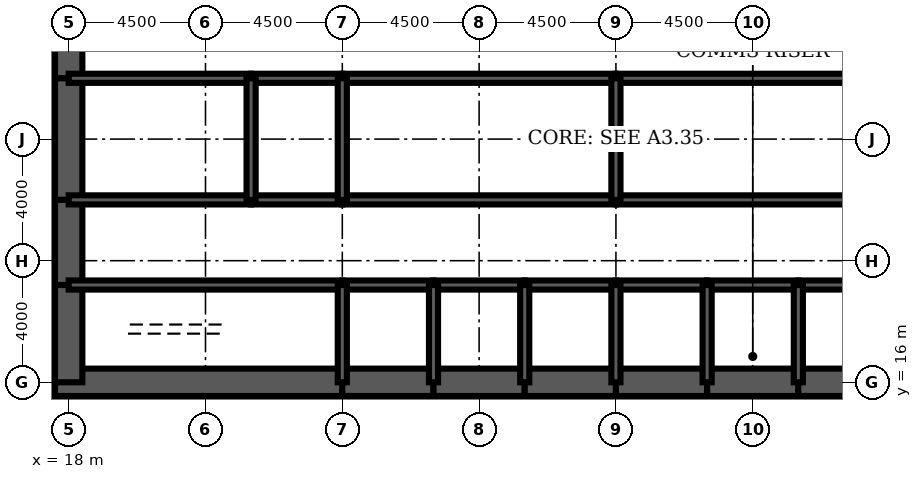
"""IFC4 building model, lengths in metres.
Left out: names, types, materials, properties, quantities, classifications, styles, units other than length and angle.
Written with IfcOpenShell. Run it as: python <this file> out.ifc"""

import sys

from ifc_helpers import new_model, si_unit, direction, frame, frame_2d, origin, place, context, subcontext, project, spatial, rectangle, extrude, element, fill, save


model = new_model("IFC4")
c1 = context("Model", 3, precision=1e-05, world=origin(), true_north=direction((0.0, 1.0)))
c2 = subcontext(c1, "Body", "Model", "MODEL_VIEW")
j1 = project(units=[si_unit("LENGTHUNIT", "METRE"), si_unit("PLANEANGLEUNIT", "RADIAN")], contexts=[c1])
p1 = place(None, origin())
s1 = spatial("IfcSite", under=j1, at=p1, CompositionType="ELEMENT")
p2 = place(p1, origin())
s2 = spatial("IfcBuilding", under=s1, at=p2, CompositionType="ELEMENT")
p3 = place(p2, frame((0.0, 0.0, 150.9)))
s3 = spatial("IfcBuildingStorey", under=s2, at=p3, CompositionType="ELEMENT", Elevation=150.9)
p4 = place(p3, frame((17.55, 16.0, 0.0), z_axis=(0.0, 0.0, 1.0), x_axis=(1.0, 0.0, 0.0)))
e1 = element("IfcWall", 1, at=p4, inside=s3, PredefinedType="SHEAR", context=c2, shape_type="SweptSolid", body=[
    extrude(rectangle(XDim=9.45, YDim=0.9, at=frame_2d((4.725, 0.0))), origin(), (0.0, 0.0, 1.0), 4.2),
])
for number, where, z_axis, x_axis in (
    (2, (27.0, 16.0, 0.0), (0.0, 0.0, 1.0), (1.0, 0.0, 0.0)),
    (3, (30.0, 16.0, 0.0), (0.0, 0.0, 1.0), (1.0, 0.0, 0.0)),
    (4, (33.0, 16.0, 0.0), (0.0, 0.0, 1.0), (1.0, 0.0, 0.0)),
    (5, (36.0, 16.0, 0.0), (0.0, 0.0, 1.0), (1.0, 0.0, 0.0)),
    (6, (39.0, 16.0, 0.0), (0.0, 0.0, 1.0), (1.0, 0.0, 0.0)),
    (7, (42.0, 16.0, 0.0), (0.0, 0.0, 1.0), (1.0, 0.0, 0.0)),
):
    element("IfcWall", number, at=place(p3, frame(where, z_axis=z_axis, x_axis=x_axis)), inside=s3, PredefinedType="SHEAR", context=c2, shape_type="SweptSolid", body=[
        extrude(rectangle(XDim=3.0, YDim=0.9, at=frame_2d((1.5, 0.0))), origin(), (0.0, 0.0, 1.0), 4.2),
    ])
p5 = place(p3, frame((18.0, 28.8, 0.0), z_axis=(0.0, 0.0, 1.0), x_axis=(0.0, -1.0, 0.0)))
e8 = element("IfcWall", 8, at=p5, inside=s3, PredefinedType="SHEAR", context=c2, shape_type="SweptSolid", body=[
    extrude(rectangle(XDim=2.8, YDim=0.9, at=frame_2d((1.4, 0.0))), origin(), (0.0, 0.0, 1.0), 4.2),
])
p6 = place(p5, frame((0.4, 0.0, 0.0)))
e9 = element("IfcOpeningElement", 9, at=p6, cuts=e8, PredefinedType="OPENING", context=c2, shape_type="SweptSolid", body=[
    extrude(rectangle(XDim=1.8, YDim=2.1, at=frame_2d((0.9, 1.05))), frame((0.0, 0.46, 0.0), z_axis=(0.0, -1.0, 0.0), x_axis=(1.0, 0.0, 0.0)), (0.0, 0.0, 1.0), 0.92),
])
p7 = place(p3, frame((18.0, 26.0, 0.0), z_axis=(0.0, 0.0, 1.0), x_axis=(0.0, -1.0, 0.0)))
e10 = element("IfcWall", 10, at=p7, inside=s3, PredefinedType="SHEAR", context=c2, shape_type="SweptSolid", body=[
    extrude(rectangle(XDim=4.0, YDim=0.9, at=frame_2d((2.0, 0.0))), origin(), (0.0, 0.0, 1.0), 4.2),
])
p8 = place(p3, frame((18.0, 22.0, 0.0), z_axis=(0.0, 0.0, 1.0), x_axis=(0.0, -1.0, 0.0)))
e11 = element("IfcWall", 11, at=p8, inside=s3, PredefinedType="SHEAR", context=c2, shape_type="SweptSolid", body=[
    extrude(rectangle(XDim=2.8, YDim=0.9, at=frame_2d((1.4, 0.0))), origin(), (0.0, 0.0, 1.0), 4.2),
])
p9 = place(p8, frame((0.6, 0.0, 0.0)))
e12 = element("IfcOpeningElement", 12, at=p9, cuts=e11, PredefinedType="OPENING", context=c2, shape_type="SweptSolid", body=[
    extrude(rectangle(XDim=1.8, YDim=2.1, at=frame_2d((0.9, 1.05))), frame((0.0, 0.46, 0.0), z_axis=(0.0, -1.0, 0.0), x_axis=(1.0, 0.0, 0.0)), (0.0, 0.0, 1.0), 0.92),
])
p10 = place(p3, frame((18.0, 19.2, 0.0), z_axis=(0.0, 0.0, 1.0), x_axis=(0.0, -1.0, 0.0)))
e13 = element("IfcWall", 13, at=p10, inside=s3, PredefinedType="SHEAR", context=c2, shape_type="SweptSolid", body=[
    extrude(rectangle(XDim=3.2, YDim=0.9, at=frame_2d((1.6, 0.0))), origin(), (0.0, 0.0, 1.0), 4.2),
])
p11 = place(p3, frame((18.0, 19.2, 0.0), z_axis=(0.0, 0.0, 1.0), x_axis=(1.0, 0.0, 0.0)))
e14 = element("IfcWall", 14, at=p11, inside=s3, PredefinedType="SOLIDWALL", context=c2, shape_type="SweptSolid", body=[
    extrude(rectangle(XDim=9.0, YDim=0.3, at=frame_2d((4.5, 0.0))), origin(), (0.0, 0.0, 1.0), 4.2),
])
p12 = place(p11, frame((0.65, 0.0, 0.0)))
e15 = element("IfcOpeningElement", 15, at=p12, cuts=e14, PredefinedType="OPENING", context=c2, shape_type="SweptSolid", body=[
    extrude(rectangle(XDim=1.0, YDim=2.1, at=frame_2d((0.5, 1.05))), frame((0.0, 0.16, 0.0), z_axis=(0.0, -1.0, 0.0), x_axis=(1.0, 0.0, 0.0)), (0.0, 0.0, 1.0), 0.32),
])
p13 = place(p3, frame((27.0, 19.2, 0.0), z_axis=(0.0, 0.0, 1.0), x_axis=(1.0, 0.0, 0.0)))
e16 = element("IfcWall", 16, at=p13, inside=s3, PredefinedType="SOLIDWALL", context=c2, shape_type="SweptSolid", body=[
    extrude(rectangle(XDim=3.0, YDim=0.3, at=frame_2d((1.5, 0.0))), origin(), (0.0, 0.0, 1.0), 4.2),
])
p14 = place(p13, frame((0.95, 0.0, 0.0)))
e17 = element("IfcOpeningElement", 17, at=p14, cuts=e16, PredefinedType="OPENING", context=c2, shape_type="SweptSolid", body=[
    extrude(rectangle(XDim=1.1, YDim=2.2, at=frame_2d((0.55, 1.1))), frame((0.0, 0.16, 0.0), z_axis=(0.0, -1.0, 0.0), x_axis=(1.0, 0.0, 0.0)), (0.0, 0.0, 1.0), 0.32),
])
p15 = place(p3, frame((30.0, 19.2, 0.0), z_axis=(0.0, 0.0, 1.0), x_axis=(1.0, 0.0, 0.0)))
e18 = element("IfcWall", 18, at=p15, inside=s3, PredefinedType="SOLIDWALL", context=c2, shape_type="SweptSolid", body=[
    extrude(rectangle(XDim=3.0, YDim=0.3, at=frame_2d((1.5, 0.0))), origin(), (0.0, 0.0, 1.0), 4.2),
])
p16 = place(p15, frame((0.95, 0.0, 0.0)))
e19 = element("IfcOpeningElement", 19, at=p16, cuts=e18, PredefinedType="OPENING", context=c2, shape_type="SweptSolid", body=[
    extrude(rectangle(XDim=1.1, YDim=2.2, at=frame_2d((0.55, 1.1))), frame((0.0, 0.16, 0.0), z_axis=(0.0, -1.0, 0.0), x_axis=(1.0, 0.0, 0.0)), (0.0, 0.0, 1.0), 0.32),
])
p17 = place(p3, frame((33.0, 19.2, 0.0), z_axis=(0.0, 0.0, 1.0), x_axis=(1.0, 0.0, 0.0)))
e20 = element("IfcWall", 20, at=p17, inside=s3, PredefinedType="SOLIDWALL", context=c2, shape_type="SweptSolid", body=[
    extrude(rectangle(XDim=3.0, YDim=0.3, at=frame_2d((1.5, 0.0))), origin(), (0.0, 0.0, 1.0), 4.2),
])
p18 = place(p17, frame((0.95, 0.0, 0.0)))
e21 = element("IfcOpeningElement", 21, at=p18, cuts=e20, PredefinedType="OPENING", context=c2, shape_type="SweptSolid", body=[
    extrude(rectangle(XDim=1.1, YDim=2.2, at=frame_2d((0.55, 1.1))), frame((0.0, 0.16, 0.0), z_axis=(0.0, -1.0, 0.0), x_axis=(1.0, 0.0, 0.0)), (0.0, 0.0, 1.0), 0.32),
])
p19 = place(p3, frame((36.0, 19.2, 0.0), z_axis=(0.0, 0.0, 1.0), x_axis=(1.0, 0.0, 0.0)))
e22 = element("IfcWall", 22, at=p19, inside=s3, PredefinedType="SOLIDWALL", context=c2, shape_type="SweptSolid", body=[
    extrude(rectangle(XDim=3.0, YDim=0.3, at=frame_2d((1.5, 0.0))), origin(), (0.0, 0.0, 1.0), 4.2),
])
p20 = place(p19, frame((0.95, 0.0, 0.0)))
e23 = element("IfcOpeningElement", 23, at=p20, cuts=e22, PredefinedType="OPENING", context=c2, shape_type="SweptSolid", body=[
    extrude(rectangle(XDim=1.1, YDim=2.2, at=frame_2d((0.55, 1.1))), frame((0.0, 0.16, 0.0), z_axis=(0.0, -1.0, 0.0), x_axis=(1.0, 0.0, 0.0)), (0.0, 0.0, 1.0), 0.32),
])
p21 = place(p3, frame((39.0, 19.2, 0.0), z_axis=(0.0, 0.0, 1.0), x_axis=(1.0, 0.0, 0.0)))
e24 = element("IfcWall", 24, at=p21, inside=s3, PredefinedType="SOLIDWALL", context=c2, shape_type="SweptSolid", body=[
    extrude(rectangle(XDim=3.0, YDim=0.3, at=frame_2d((1.5, 0.0))), origin(), (0.0, 0.0, 1.0), 4.2),
])
p22 = place(p21, frame((1.0, 0.0, 0.0)))
e25 = element("IfcOpeningElement", 25, at=p22, cuts=e24, PredefinedType="OPENING", context=c2, shape_type="SweptSolid", body=[
    extrude(rectangle(XDim=1.0, YDim=2.1, at=frame_2d((0.5, 1.05))), frame((0.0, 0.16, 0.0), z_axis=(0.0, -1.0, 0.0), x_axis=(1.0, 0.0, 0.0)), (0.0, 0.0, 1.0), 0.32),
])
p23 = place(p3, frame((42.0, 19.2, 0.0), z_axis=(0.0, 0.0, 1.0), x_axis=(1.0, 0.0, 0.0)))
e26 = element("IfcWall", 26, at=p23, inside=s3, PredefinedType="SOLIDWALL", context=c2, shape_type="SweptSolid", body=[
    extrude(rectangle(XDim=3.0, YDim=0.3, at=frame_2d((1.5, 0.0))), origin(), (0.0, 0.0, 1.0), 4.2),
])
p24 = place(p3, frame((18.0, 22.0, 0.0), z_axis=(0.0, 0.0, 1.0), x_axis=(1.0, 0.0, 0.0)))
e27 = element("IfcWall", 27, at=p24, inside=s3, PredefinedType="SOLIDWALL", context=c2, shape_type="SweptSolid", body=[
    extrude(rectangle(XDim=6.0, YDim=0.3, at=frame_2d((3.0, 0.0))), origin(), (0.0, 0.0, 1.0), 4.2),
])
p25 = place(p24, frame((4.4, 0.0, 0.0)))
e28 = element("IfcOpeningElement", 28, at=p25, cuts=e27, PredefinedType="OPENING", context=c2, shape_type="SweptSolid", body=[
    extrude(rectangle(XDim=1.0, YDim=2.1, at=frame_2d((0.5, 1.05))), frame((0.0, 0.16, 0.0), z_axis=(0.0, -1.0, 0.0), x_axis=(1.0, 0.0, 0.0)), (0.0, 0.0, 1.0), 0.32),
])
p26 = place(p24, frame((0.85, 0.0, 0.0)))
e29 = element("IfcOpeningElement", 29, at=p26, cuts=e27, PredefinedType="OPENING", context=c2, shape_type="SweptSolid", body=[
    extrude(rectangle(XDim=1.0, YDim=2.1, at=frame_2d((0.5, 1.05))), frame((0.0, 0.16, 0.0), z_axis=(0.0, -1.0, 0.0), x_axis=(1.0, 0.0, 0.0)), (0.0, 0.0, 1.0), 0.32),
])
p27 = place(p3, frame((24.0, 22.0, 0.0), z_axis=(0.0, 0.0, 1.0), x_axis=(1.0, 0.0, 0.0)))
e30 = element("IfcWall", 30, at=p27, inside=s3, PredefinedType="SOLIDWALL", context=c2, shape_type="SweptSolid", body=[
    extrude(rectangle(XDim=3.0, YDim=0.3, at=frame_2d((1.5, 0.0))), origin(), (0.0, 0.0, 1.0), 4.2),
])
p28 = place(p27, frame((1.0, 0.0, 0.0)))
e31 = element("IfcOpeningElement", 31, at=p28, cuts=e30, PredefinedType="OPENING", context=c2, shape_type="SweptSolid", body=[
    extrude(rectangle(XDim=1.0, YDim=2.1, at=frame_2d((0.5, 1.05))), frame((0.0, 0.16, 0.0), z_axis=(0.0, -1.0, 0.0), x_axis=(1.0, 0.0, 0.0)), (0.0, 0.0, 1.0), 0.32),
])
p29 = place(p3, frame((27.0, 22.0, 0.0), z_axis=(0.0, 0.0, 1.0), x_axis=(1.0, 0.0, 0.0)))
e32 = element("IfcWall", 32, at=p29, inside=s3, PredefinedType="SOLIDWALL", context=c2, shape_type="SweptSolid", body=[
    extrude(rectangle(XDim=9.0, YDim=0.3, at=frame_2d((4.5, 0.0))), origin(), (0.0, 0.0, 1.0), 4.2),
])
p30 = place(p29, frame((4.0, 0.0, 0.0)))
e33 = element("IfcOpeningElement", 33, at=p30, cuts=e32, PredefinedType="OPENING", context=c2, shape_type="SweptSolid", body=[
    extrude(rectangle(XDim=1.0, YDim=2.1, at=frame_2d((0.5, 1.05))), frame((0.0, 0.16, 0.0), z_axis=(0.0, -1.0, 0.0), x_axis=(1.0, 0.0, 0.0)), (0.0, 0.0, 1.0), 0.32),
])
p31 = place(p3, frame((36.0, 22.0, 0.0), z_axis=(0.0, 0.0, 1.0), x_axis=(1.0, 0.0, 0.0)))
e34 = element("IfcWall", 34, at=p31, inside=s3, PredefinedType="SOLIDWALL", context=c2, shape_type="SweptSolid", body=[
    extrude(rectangle(XDim=9.0, YDim=0.3, at=frame_2d((4.5, 0.0))), origin(), (0.0, 0.0, 1.0), 4.2),
])
p32 = place(p31, frame((4.0, 0.0, 0.0)))
e35 = element("IfcOpeningElement", 35, at=p32, cuts=e34, PredefinedType="OPENING", context=c2, shape_type="SweptSolid", body=[
    extrude(rectangle(XDim=1.0, YDim=2.1, at=frame_2d((0.5, 1.05))), frame((0.0, 0.16, 0.0), z_axis=(0.0, -1.0, 0.0), x_axis=(1.0, 0.0, 0.0)), (0.0, 0.0, 1.0), 0.32),
])
p33 = place(p3, frame((18.0, 26.0, 0.0), z_axis=(0.0, 0.0, 1.0), x_axis=(1.0, 0.0, 0.0)))
e36 = element("IfcWall", 36, at=p33, inside=s3, PredefinedType="SOLIDWALL", context=c2, shape_type="SweptSolid", body=[
    extrude(rectangle(XDim=6.0, YDim=0.3, at=frame_2d((3.0, 0.0))), origin(), (0.0, 0.0, 1.0), 4.2),
])
p34 = place(p3, frame((24.0, 26.0, 0.0), z_axis=(0.0, 0.0, 1.0), x_axis=(1.0, 0.0, 0.0)))
e37 = element("IfcWall", 37, at=p34, inside=s3, PredefinedType="SOLIDWALL", context=c2, shape_type="SweptSolid", body=[
    extrude(rectangle(XDim=3.0, YDim=0.3, at=frame_2d((1.5, 0.0))), origin(), (0.0, 0.0, 1.0), 4.2),
])
for number, where, z_axis, x_axis in (
    (38, (27.0, 26.0, 0.0), (0.0, 0.0, 1.0), (1.0, 0.0, 0.0)),
    (39, (36.0, 26.0, 0.0), (0.0, 0.0, 1.0), (1.0, 0.0, 0.0)),
):
    element("IfcWall", number, at=place(p3, frame(where, z_axis=z_axis, x_axis=x_axis)), inside=s3, PredefinedType="SOLIDWALL", context=c2, shape_type="SweptSolid", body=[
        extrude(rectangle(XDim=9.0, YDim=0.3, at=frame_2d((4.5, 0.0))), origin(), (0.0, 0.0, 1.0), 4.2),
    ])
for number, where, z_axis, x_axis in (
    (40, (27.0, 16.0, 0.0), (0.0, 0.0, 1.0), (0.0, 1.0, 0.0)),
    (41, (30.0, 16.0, 0.0), (0.0, 0.0, 1.0), (0.0, 1.0, 0.0)),
    (42, (33.0, 16.0, 0.0), (0.0, 0.0, 1.0), (0.0, 1.0, 0.0)),
    (43, (36.0, 16.0, 0.0), (0.0, 0.0, 1.0), (0.0, 1.0, 0.0)),
    (44, (39.0, 16.0, 0.0), (0.0, 0.0, 1.0), (0.0, 1.0, 0.0)),
    (45, (42.0, 16.0, 0.0), (0.0, 0.0, 1.0), (0.0, 1.0, 0.0)),
):
    element("IfcWall", number, at=place(p3, frame(where, z_axis=z_axis, x_axis=x_axis)), inside=s3, PredefinedType="SOLIDWALL", context=c2, shape_type="SweptSolid", body=[
        extrude(rectangle(XDim=3.2, YDim=0.3, at=frame_2d((1.6, 0.0))), origin(), (0.0, 0.0, 1.0), 4.2),
    ])
for number, where, z_axis, x_axis in (
    (46, (24.0, 22.0, 0.0), (0.0, 0.0, 1.0), (0.0, 1.0, 0.0)),
    (47, (27.0, 22.0, 0.0), (0.0, 0.0, 1.0), (0.0, 1.0, 0.0)),
    (48, (36.0, 22.0, 0.0), (0.0, 0.0, 1.0), (0.0, 1.0, 0.0)),
):
    element("IfcWall", number, at=place(p3, frame(where, z_axis=z_axis, x_axis=x_axis)), inside=s3, PredefinedType="SOLIDWALL", context=c2, shape_type="SweptSolid", body=[
        extrude(rectangle(XDim=4.0, YDim=0.3, at=frame_2d((2.0, 0.0))), origin(), (0.0, 0.0, 1.0), 4.2),
    ])
p35 = place(p3, frame((39.15, 17.4, 0.0), z_axis=(0.0, 0.0, 1.0), x_axis=(1.0, 0.0, 0.0)))
e49 = element("IfcWall", 49, at=p35, inside=s3, PredefinedType="SOLIDWALL", context=c2, shape_type="SweptSolid", body=[
    extrude(rectangle(XDim=2.7, YDim=0.3, at=frame_2d((1.35, 0.0))), origin(), (0.0, 0.0, 1.0), 4.04),
])
p36 = place(p35, frame((0.85, 0.0, 0.0)))
e50 = element("IfcOpeningElement", 50, at=p36, cuts=e49, PredefinedType="OPENING", context=c2, shape_type="SweptSolid", body=[
    extrude(rectangle(XDim=1.0, YDim=2.1, at=frame_2d((0.5, 1.05))), frame((0.0, 0.16, 0.0), z_axis=(0.0, -1.0, 0.0), x_axis=(1.0, 0.0, 0.0)), (0.0, 0.0, 1.0), 0.32),
])
p37 = place(p3, frame((42.5, 22.15, 0.0), z_axis=(0.0, 0.0, 1.0), x_axis=(0.0, 1.0, 0.0)))
e51 = element("IfcWall", 51, at=p37, inside=s3, PredefinedType="PARTITIONING", context=c2, shape_type="SweptSolid", body=[
    extrude(rectangle(XDim=3.7, YDim=0.15, at=frame_2d((1.85, 0.0))), origin(), (0.0, 0.0, 1.0), 3.0),
])
p38 = place(p37, frame((2.2, 0.0, 0.0)))
e52 = element("IfcOpeningElement", 52, at=p38, cuts=e51, PredefinedType="OPENING", context=c2, shape_type="SweptSolid", body=[
    extrude(rectangle(XDim=1.0, YDim=2.1, at=frame_2d((0.5, 1.05))), frame((0.0, 0.085, 0.0), z_axis=(0.0, -1.0, 0.0), x_axis=(1.0, 0.0, 0.0)), (0.0, 0.0, 1.0), 0.17),
])
p39 = place(p3, frame((20.325, 22.15, 0.0), z_axis=(0.0, 0.0, 1.0), x_axis=(0.0, 1.0, 0.0)))
e53 = element("IfcWall", 53, at=p39, inside=s3, PredefinedType="PARTITIONING", context=c2, shape_type="SweptSolid", body=[
    extrude(rectangle(XDim=3.7, YDim=0.15, at=frame_2d((1.85, 0.0))), origin(), (0.0, 0.0, 1.0), 3.0),
])
p40 = place(p3, frame((24.5, 19.35, 0.0), z_axis=(0.0, 0.0, 1.0), x_axis=(0.0, 1.0, 0.0)))
e54 = element("IfcWall", 54, at=p40, inside=s3, PredefinedType="PARTITIONING", context=c2, shape_type="SweptSolid", body=[
    extrude(rectangle(XDim=2.5, YDim=0.15, at=frame_2d((1.25, 0.0))), origin(), (0.0, 0.0, 1.0), 3.0),
])
p41 = place(p40, frame((1.15, 0.0, 0.0)))
e55 = element("IfcOpeningElement", 55, at=p41, cuts=e54, PredefinedType="OPENING", context=c2, shape_type="SweptSolid", body=[
    extrude(rectangle(XDim=1.0, YDim=2.1, at=frame_2d((0.5, 1.05))), frame((0.0, 0.085, 0.0), z_axis=(0.0, -1.0, 0.0), x_axis=(1.0, 0.0, 0.0)), (0.0, 0.0, 1.0), 0.17),
])
p42 = place(p36, origin())
e56 = element("IfcDoor", 56, at=p42, inside=s3, OperationType="SINGLE_SWING_LEFT", PredefinedType="DOOR", context=c2, shape_type="SweptSolid", body=[
    extrude(rectangle(XDim=1.0, YDim=2.1, at=frame_2d((0.5, 1.05))), frame((0.0, 0.025, 0.0), z_axis=(0.0, -1.0, 0.0), x_axis=(1.0, 0.0, 0.0)), (0.0, 0.0, 1.0), 0.05),
])
fill(e50, e56)
p43 = place(p38, origin())
e57 = element("IfcDoor", 57, at=p43, inside=s3, OperationType="SINGLE_SWING_RIGHT", PredefinedType="DOOR", context=c2, shape_type="SweptSolid", body=[
    extrude(rectangle(XDim=1.0, YDim=2.1, at=frame_2d((0.5, 1.05))), frame((0.0, 0.025, 0.0), z_axis=(0.0, -1.0, 0.0), x_axis=(1.0, 0.0, 0.0)), (0.0, 0.0, 1.0), 0.05),
])
fill(e52, e57)
p44 = place(p41, origin())
e58 = element("IfcDoor", 58, at=p44, inside=s3, OperationType="SINGLE_SWING_RIGHT", PredefinedType="DOOR", context=c2, shape_type="SweptSolid", body=[
    extrude(rectangle(XDim=1.0, YDim=2.1, at=frame_2d((0.5, 1.05))), frame((0.0, 0.025, 0.0), z_axis=(0.0, -1.0, 0.0), x_axis=(1.0, 0.0, 0.0)), (0.0, 0.0, 1.0), 0.05),
])
fill(e55, e58)
p45 = place(p14, origin())
e59 = element("IfcDoor", 59, at=p45, inside=s3, OperationType="DOUBLE_DOOR_SLIDING", PredefinedType="USERDEFINED", context=c2, shape_type="SweptSolid", body=[
    extrude(rectangle(XDim=1.1, YDim=2.2, at=frame_2d((0.55, 1.1))), frame((0.0, 0.025, 0.0), z_axis=(0.0, -1.0, 0.0), x_axis=(1.0, 0.0, 0.0)), (0.0, 0.0, 1.0), 0.05),
])
fill(e17, e59)
p46 = place(p16, origin())
e60 = element("IfcDoor", 60, at=p46, inside=s3, OperationType="DOUBLE_DOOR_SLIDING", PredefinedType="USERDEFINED", context=c2, shape_type="SweptSolid", body=[
    extrude(rectangle(XDim=1.1, YDim=2.2, at=frame_2d((0.55, 1.1))), frame((0.0, 0.025, 0.0), z_axis=(0.0, -1.0, 0.0), x_axis=(1.0, 0.0, 0.0)), (0.0, 0.0, 1.0), 0.05),
])
fill(e19, e60)
p47 = place(p18, origin())
e61 = element("IfcDoor", 61, at=p47, inside=s3, OperationType="DOUBLE_DOOR_SLIDING", PredefinedType="USERDEFINED", context=c2, shape_type="SweptSolid", body=[
    extrude(rectangle(XDim=1.1, YDim=2.2, at=frame_2d((0.55, 1.1))), frame((0.0, 0.025, 0.0), z_axis=(0.0, -1.0, 0.0), x_axis=(1.0, 0.0, 0.0)), (0.0, 0.0, 1.0), 0.05),
])
fill(e21, e61)
p48 = place(p20, origin())
e62 = element("IfcDoor", 62, at=p48, inside=s3, OperationType="DOUBLE_DOOR_SLIDING", PredefinedType="USERDEFINED", context=c2, shape_type="SweptSolid", body=[
    extrude(rectangle(XDim=1.1, YDim=2.2, at=frame_2d((0.55, 1.1))), frame((0.0, 0.025, 0.0), z_axis=(0.0, -1.0, 0.0), x_axis=(1.0, 0.0, 0.0)), (0.0, 0.0, 1.0), 0.05),
])
fill(e23, e62)
p49 = place(p12, origin())
e63 = element("IfcDoor", 63, at=p49, inside=s3, OperationType="SINGLE_SWING_LEFT", PredefinedType="DOOR", context=c2, shape_type="SweptSolid", body=[
    extrude(rectangle(XDim=1.0, YDim=2.1, at=frame_2d((0.5, 1.05))), frame((0.0, 0.025, 0.0), z_axis=(0.0, -1.0, 0.0), x_axis=(1.0, 0.0, 0.0)), (0.0, 0.0, 1.0), 0.05),
])
fill(e15, e63)
p50 = place(p9, origin())
e64 = element("IfcDoor", 64, at=p50, inside=s3, OperationType="SINGLE_SWING_LEFT", PredefinedType="DOOR", context=c2, shape_type="SweptSolid", body=[
    extrude(rectangle(XDim=1.8, YDim=2.1, at=frame_2d((0.9, 1.05))), frame((0.0, 0.45, 0.0), z_axis=(0.0, -1.0, 0.0), x_axis=(1.0, 0.0, 0.0)), (0.0, 0.0, 1.0), 0.899),
])
fill(e12, e64)
p51 = place(p6, origin())
e65 = element("IfcDoor", 65, at=p51, inside=s3, OperationType="SINGLE_SWING_LEFT", PredefinedType="DOOR", context=c2, shape_type="SweptSolid", body=[
    extrude(rectangle(XDim=1.8, YDim=2.1, at=frame_2d((0.9, 1.05))), frame((0.0, 0.45, 0.0), z_axis=(0.0, -1.0, 0.0), x_axis=(1.0, 0.0, 0.0)), (0.0, 0.0, 1.0), 0.899),
])
fill(e9, e65)
p52 = place(p25, origin())
e66 = element("IfcDoor", 66, at=p52, inside=s3, OperationType="SINGLE_SWING_RIGHT", PredefinedType="DOOR", context=c2, shape_type="SweptSolid", body=[
    extrude(rectangle(XDim=1.0, YDim=2.1, at=frame_2d((0.5, 1.05))), frame((0.0, 0.025, 0.0), z_axis=(0.0, -1.0, 0.0), x_axis=(1.0, 0.0, 0.0)), (0.0, 0.0, 1.0), 0.05),
])
fill(e28, e66)
p53 = place(p28, origin())
e67 = element("IfcDoor", 67, at=p53, inside=s3, OperationType="SINGLE_SWING_LEFT", PredefinedType="DOOR", context=c2, shape_type="SweptSolid", body=[
    extrude(rectangle(XDim=1.0, YDim=2.1, at=frame_2d((0.5, 1.05))), frame((0.0, 0.025, 0.0), z_axis=(0.0, -1.0, 0.0), x_axis=(1.0, 0.0, 0.0)), (0.0, 0.0, 1.0), 0.05),
])
fill(e31, e67)
p54 = place(p30, origin())
e68 = element("IfcDoor", 68, at=p54, inside=s3, OperationType="SINGLE_SWING_LEFT", PredefinedType="DOOR", context=c2, shape_type="SweptSolid", body=[
    extrude(rectangle(XDim=1.0, YDim=2.1, at=frame_2d((0.5, 1.05))), frame((0.0, 0.025, 0.0), z_axis=(0.0, -1.0, 0.0), x_axis=(1.0, 0.0, 0.0)), (0.0, 0.0, 1.0), 0.05),
])
fill(e33, e68)
p55 = place(p32, origin())
e69 = element("IfcDoor", 69, at=p55, inside=s3, OperationType="SINGLE_SWING_LEFT", PredefinedType="DOOR", context=c2, shape_type="SweptSolid", body=[
    extrude(rectangle(XDim=1.0, YDim=2.1, at=frame_2d((0.5, 1.05))), frame((0.0, 0.025, 0.0), z_axis=(0.0, -1.0, 0.0), x_axis=(1.0, 0.0, 0.0)), (0.0, 0.0, 1.0), 0.05),
])
fill(e35, e69)
p56 = place(p26, origin())
e70 = element("IfcDoor", 70, at=p56, inside=s3, OperationType="SINGLE_SWING_LEFT", PredefinedType="DOOR", context=c2, shape_type="SweptSolid", body=[
    extrude(rectangle(XDim=1.0, YDim=2.1, at=frame_2d((0.5, 1.05))), frame((0.0, 0.025, 0.0), z_axis=(0.0, -1.0, 0.0), x_axis=(1.0, 0.0, 0.0)), (0.0, 0.0, 1.0), 0.05),
])
fill(e29, e70)
p57 = place(p22, origin())
e71 = element("IfcDoor", 71, at=p57, inside=s3, OperationType="SINGLE_SWING_LEFT", PredefinedType="DOOR", context=c2, shape_type="SweptSolid", body=[
    extrude(rectangle(XDim=1.0, YDim=2.1, at=frame_2d((0.5, 1.05))), frame((0.0, 0.025, 0.0), z_axis=(0.0, -1.0, 0.0), x_axis=(1.0, 0.0, 0.0)), (0.0, 0.0, 1.0), 0.05),
])
fill(e25, e71)
save(model, sys.argv[1])
